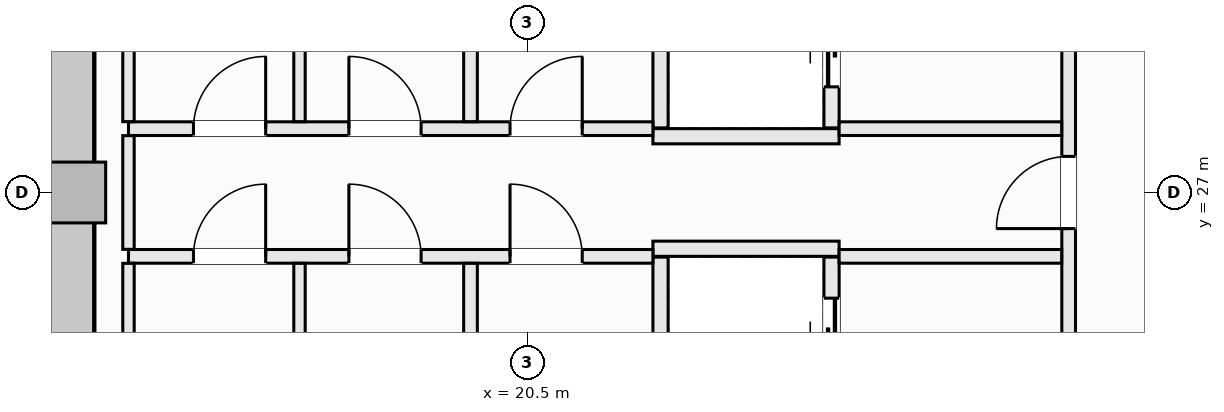
"""IFC4 building model, lengths in metres.
Left out: names, types, materials, properties, quantities, classifications, styles, units other than length and angle.
Written with IfcOpenShell. Run it as: python <this file> out.ifc"""

import sys

from ifc_helpers import new_model, si_unit, direction, frame, frame_2d, origin, origin_2d, place, context, subcontext, project, spatial, rectangle, extrude, element, fill, save


model = new_model("IFC4")
c1 = context("Model", 3, precision=1e-05, world=origin(), true_north=direction((0.0, 1.0)))
c2 = subcontext(c1, "Body", "Model", "MODEL_VIEW")
j1 = project(units=[si_unit("LENGTHUNIT", "METRE"), si_unit("PLANEANGLEUNIT", "RADIAN")], contexts=[c1])
p1 = place(None, origin())
s1 = spatial("IfcSite", under=j1, at=p1, CompositionType="ELEMENT")
p2 = place(p1, origin())
s2 = spatial("IfcBuilding", under=s1, at=p2, CompositionType="ELEMENT")
p3 = place(p2, frame((0.0, 0.0, 156.3)))
s3 = spatial("IfcBuildingStorey", under=s2, at=p3, CompositionType="ELEMENT", Elevation=156.3)
p4 = place(p3, frame((14.475, 20.55, -0.27), z_axis=(0.0, 0.0, 1.0), x_axis=(0.0, 1.0, 0.0)))
e1 = element("IfcWall", 1, at=p4, inside=s3, PredefinedType="SHEAR", context=c2, shape_type="SweptSolid", body=[
    extrude(rectangle(XDim=12.9, YDim=0.65, at=frame_2d((6.45, 0.0))), origin(), (0.0, 0.0, 1.0), 3.4),
])
p5 = place(p3, frame((14.55, 27.0, -0.27), z_axis=(0.0, 0.0, 1.0), x_axis=(1.0, 0.0, 0.0)))
e2 = element("IfcColumn", 2, at=p5, inside=s3, PredefinedType="PILASTER", context=c2, shape_type="SweptSolid", body=[
    extrude(rectangle(XDim=0.8, YDim=0.8, at=origin_2d()), origin(), (0.0, 0.0, 1.0), 3.4),
])
p6 = place(p3, frame((22.15, 27.74, 0.0), z_axis=(0.0, 0.0, 1.0), x_axis=(1.0, 0.0, 0.0)))
e3 = element("IfcWall", 3, at=p6, inside=s3, PredefinedType="SOLIDWALL", context=c2, shape_type="SweptSolid", body=[
    extrude(rectangle(XDim=2.45, YDim=0.2, at=frame_2d((1.225, 0.0))), origin(), (0.0, 0.0, 1.0), 3.13),
])
p7 = place(p3, frame((22.25, 27.85, 0.0), z_axis=(0.0, 0.0, 1.0), x_axis=(0.0, 1.0, 0.0)))
e4 = element("IfcWall", 4, at=p7, inside=s3, PredefinedType="SOLIDWALL", context=c2, shape_type="SweptSolid", body=[
    extrude(rectangle(XDim=2.18, YDim=0.2, at=frame_2d((1.09, 0.0))), origin(), (0.0, 0.0, 1.0), 3.13),
])
p8 = place(p3, frame((24.5, 27.85, 0.0), z_axis=(0.0, 0.0, 1.0), x_axis=(0.0, 1.0, 0.0)))
e5 = element("IfcWall", 5, at=p8, inside=s3, PredefinedType="SOLIDWALL", context=c2, shape_type="SweptSolid", body=[
    extrude(rectangle(XDim=2.18, YDim=0.2, at=frame_2d((1.09, 0.0))), origin(), (0.0, 0.0, 1.0), 3.13),
])
p9 = place(p8, frame((0.54, 0.0, 0.0)))
e6 = element("IfcOpeningElement", 6, at=p9, cuts=e5, PredefinedType="OPENING", context=c2, shape_type="SweptSolid", body=[
    extrude(rectangle(XDim=1.1, YDim=2.2, at=frame_2d((0.55, 1.1))), frame((0.0, 0.11, 0.0), z_axis=(0.0, -1.0, 0.0), x_axis=(1.0, 0.0, 0.0)), (0.0, 0.0, 1.0), 0.22),
])
p10 = place(p3, frame((22.15, 26.26, 0.0), z_axis=(0.0, 0.0, 1.0), x_axis=(1.0, 0.0, 0.0)))
e7 = element("IfcWall", 7, at=p10, inside=s3, PredefinedType="SOLIDWALL", context=c2, shape_type="SweptSolid", body=[
    extrude(rectangle(XDim=2.45, YDim=0.2, at=frame_2d((1.225, 0.0))), origin(), (0.0, 0.0, 1.0), 3.13),
])
p11 = place(p3, frame((22.25, 23.97, 0.0), z_axis=(0.0, 0.0, 1.0), x_axis=(0.0, 1.0, 0.0)))
e8 = element("IfcWall", 8, at=p11, inside=s3, PredefinedType="SOLIDWALL", context=c2, shape_type="SweptSolid", body=[
    extrude(rectangle(XDim=2.18, YDim=0.2, at=frame_2d((1.09, 0.0))), origin(), (0.0, 0.0, 1.0), 3.13),
])
p12 = place(p3, frame((24.5, 23.97, 0.0), z_axis=(0.0, 0.0, 1.0), x_axis=(0.0, 1.0, 0.0)))
e9 = element("IfcWall", 9, at=p12, inside=s3, PredefinedType="SOLIDWALL", context=c2, shape_type="SweptSolid", body=[
    extrude(rectangle(XDim=2.18, YDim=0.2, at=frame_2d((1.09, 0.0))), origin(), (0.0, 0.0, 1.0), 3.13),
])
p13 = place(p12, frame((0.54, 0.0, 0.0)))
e10 = element("IfcOpeningElement", 10, at=p13, cuts=e9, PredefinedType="OPENING", context=c2, shape_type="SweptSolid", body=[
    extrude(rectangle(XDim=1.1, YDim=2.2, at=frame_2d((0.55, 1.1))), frame((0.0, 0.11, 0.0), z_axis=(0.0, -1.0, 0.0), x_axis=(1.0, 0.0, 0.0)), (0.0, 0.0, 1.0), 0.22),
])
p14 = place(p3, frame((27.62, 22.05, 0.0), z_axis=(0.0, 0.0, 1.0), x_axis=(0.0, 1.0, 0.0)))
e11 = element("IfcWall", 11, at=p14, inside=s3, PredefinedType="SOLIDWALL", context=c2, shape_type="SweptSolid", body=[
    extrude(rectangle(XDim=9.9, YDim=0.18, at=frame_2d((4.95, 0.0))), origin(), (0.0, 0.0, 1.0), 3.13),
])
p15 = place(p14, frame((4.475, 0.0, 0.0)))
e12 = element("IfcOpeningElement", 12, at=p15, cuts=e11, PredefinedType="OPENING", context=c2, shape_type="SweptSolid", body=[
    extrude(rectangle(XDim=0.95, YDim=2.1, at=frame_2d((0.475, 1.05))), frame((0.0, 0.1, 0.0), z_axis=(0.0, -1.0, 0.0), x_axis=(1.0, 0.0, 0.0)), (0.0, 0.0, 1.0), 0.2),
])
p16 = place(p14, frame((6.89, 0.0, 0.0)))
e13 = element("IfcOpeningElement", 13, at=p16, cuts=e11, PredefinedType="OPENING", context=c2, shape_type="SweptSolid", body=[
    extrude(rectangle(XDim=1.5, YDim=2.2, at=frame_2d((0.75, 1.1))), frame((0.0, 0.1, 0.0), z_axis=(0.0, -1.0, 0.0), x_axis=(1.0, 0.0, 0.0)), (0.0, 0.0, 1.0), 0.2),
])
p17 = place(p14, frame((1.51, 0.0, 0.0)))
e14 = element("IfcOpeningElement", 14, at=p17, cuts=e11, PredefinedType="OPENING", context=c2, shape_type="SweptSolid", body=[
    extrude(rectangle(XDim=1.5, YDim=2.2, at=frame_2d((0.75, 1.1))), frame((0.0, 0.1, 0.0), z_axis=(0.0, -1.0, 0.0), x_axis=(1.0, 0.0, 0.0)), (0.0, 0.0, 1.0), 0.2),
])
p18 = place(p3, frame((15.25, 27.84, 0.0), z_axis=(0.0, 0.0, 1.0), x_axis=(1.0, 0.0, 0.0)))
e15 = element("IfcWall", 15, at=p18, inside=s3, PredefinedType="SOLIDWALL", context=c2, shape_type="SweptSolid", body=[
    extrude(rectangle(XDim=6.9, YDim=0.18, at=frame_2d((3.45, 0.0))), origin(), (0.0, 0.0, 1.0), 3.13),
])
p19 = place(p18, frame((5.02, 0.0, 0.0)))
e16 = element("IfcOpeningElement", 16, at=p19, cuts=e15, PredefinedType="OPENING", context=c2, shape_type="SweptSolid", body=[
    extrude(rectangle(XDim=0.95, YDim=2.1, at=frame_2d((0.475, 1.05))), frame((0.0, 0.1, 0.0), z_axis=(0.0, -1.0, 0.0), x_axis=(1.0, 0.0, 0.0)), (0.0, 0.0, 1.0), 0.2),
])
p20 = place(p18, frame((0.855, 0.0, 0.0)))
e17 = element("IfcOpeningElement", 17, at=p20, cuts=e15, PredefinedType="OPENING", context=c2, shape_type="SweptSolid", body=[
    extrude(rectangle(XDim=0.95, YDim=2.1, at=frame_2d((0.475, 1.05))), frame((0.0, 0.1, 0.0), z_axis=(0.0, -1.0, 0.0), x_axis=(1.0, 0.0, 0.0)), (0.0, 0.0, 1.0), 0.2),
])
p21 = place(p18, frame((2.9, 0.0, 0.0)))
e18 = element("IfcOpeningElement", 18, at=p21, cuts=e15, PredefinedType="OPENING", context=c2, shape_type="SweptSolid", body=[
    extrude(rectangle(XDim=0.95, YDim=2.1, at=frame_2d((0.475, 1.05))), frame((0.0, 0.1, 0.0), z_axis=(0.0, -1.0, 0.0), x_axis=(1.0, 0.0, 0.0)), (0.0, 0.0, 1.0), 0.2),
])
p22 = place(p3, frame((24.6, 27.84, 0.0), z_axis=(0.0, 0.0, 1.0), x_axis=(1.0, 0.0, 0.0)))
e19 = element("IfcWall", 19, at=p22, inside=s3, PredefinedType="SOLIDWALL", context=c2, shape_type="SweptSolid", body=[
    extrude(rectangle(XDim=2.928, YDim=0.18, at=frame_2d((1.464, 0.0))), origin(), (0.0, 0.0, 1.0), 3.13),
])
p23 = place(p3, frame((15.25, 26.16, 0.0), z_axis=(0.0, 0.0, 1.0), x_axis=(1.0, 0.0, 0.0)))
e20 = element("IfcWall", 20, at=p23, inside=s3, PredefinedType="SOLIDWALL", context=c2, shape_type="SweptSolid", body=[
    extrude(rectangle(XDim=6.9, YDim=0.18, at=frame_2d((3.45, 0.0))), origin(), (0.0, 0.0, 1.0), 3.13),
])
p24 = place(p23, frame((5.02, 0.0, 0.0)))
e21 = element("IfcOpeningElement", 21, at=p24, cuts=e20, PredefinedType="OPENING", context=c2, shape_type="SweptSolid", body=[
    extrude(rectangle(XDim=0.95, YDim=2.1, at=frame_2d((0.475, 1.05))), frame((0.0, 0.1, 0.0), z_axis=(0.0, -1.0, 0.0), x_axis=(1.0, 0.0, 0.0)), (0.0, 0.0, 1.0), 0.2),
])
p25 = place(p23, frame((0.855, 0.0, 0.0)))
e22 = element("IfcOpeningElement", 22, at=p25, cuts=e20, PredefinedType="OPENING", context=c2, shape_type="SweptSolid", body=[
    extrude(rectangle(XDim=0.95, YDim=2.1, at=frame_2d((0.475, 1.05))), frame((0.0, 0.1, 0.0), z_axis=(0.0, -1.0, 0.0), x_axis=(1.0, 0.0, 0.0)), (0.0, 0.0, 1.0), 0.2),
])
p26 = place(p23, frame((2.9, 0.0, 0.0)))
e23 = element("IfcOpeningElement", 23, at=p26, cuts=e20, PredefinedType="OPENING", context=c2, shape_type="SweptSolid", body=[
    extrude(rectangle(XDim=0.95, YDim=2.1, at=frame_2d((0.475, 1.05))), frame((0.0, 0.1, 0.0), z_axis=(0.0, -1.0, 0.0), x_axis=(1.0, 0.0, 0.0)), (0.0, 0.0, 1.0), 0.2),
])
p27 = place(p3, frame((24.6, 26.16, 0.0), z_axis=(0.0, 0.0, 1.0), x_axis=(1.0, 0.0, 0.0)))
e24 = element("IfcWall", 24, at=p27, inside=s3, PredefinedType="SOLIDWALL", context=c2, shape_type="SweptSolid", body=[
    extrude(rectangle(XDim=2.928, YDim=0.18, at=frame_2d((1.464, 0.0))), origin(), (0.0, 0.0, 1.0), 3.13),
])
p28 = place(p3, frame((15.25, 23.962, 0.0), z_axis=(0.0, 0.0, 1.0), x_axis=(0.0, 1.0, 0.0)))
e25 = element("IfcWall", 25, at=p28, inside=s3, PredefinedType="PARTITIONING", context=c2, shape_type="SweptSolid", body=[
    extrude(rectangle(XDim=2.106, YDim=0.15, at=frame_2d((1.053, 0.0))), origin(), (0.0, 0.0, 1.0), 3.13),
])
p29 = place(p3, frame((15.25, 26.252, 0.0), z_axis=(0.0, 0.0, 1.0), x_axis=(0.0, 1.0, 0.0)))
e26 = element("IfcWall", 26, at=p29, inside=s3, PredefinedType="PARTITIONING", context=c2, shape_type="SweptSolid", body=[
    extrude(rectangle(XDim=1.496, YDim=0.15, at=frame_2d((0.748, 0.0))), origin(), (0.0, 0.0, 1.0), 3.13),
])
p30 = place(p3, frame((15.25, 27.932, 0.0), z_axis=(0.0, 0.0, 1.0), x_axis=(0.0, 1.0, 0.0)))
e27 = element("IfcWall", 27, at=p30, inside=s3, PredefinedType="PARTITIONING", context=c2, shape_type="SweptSolid", body=[
    extrude(rectangle(XDim=2.106, YDim=0.15, at=frame_2d((1.053, 0.0))), origin(), (0.0, 0.0, 1.0), 3.13),
])
for number, where, z_axis, x_axis in (
    (28, (19.75, 23.962, 0.0), (0.0, 0.0, 1.0), (0.0, 1.0, 0.0)),
    (29, (19.75, 27.932, 0.0), (0.0, 0.0, 1.0), (0.0, 1.0, 0.0)),
):
    element("IfcWall", number, at=place(p3, frame(where, z_axis=z_axis, x_axis=x_axis)), inside=s3, PredefinedType="SOLIDWALL", context=c2, shape_type="SweptSolid", body=[
        extrude(rectangle(XDim=2.106, YDim=0.18, at=frame_2d((1.053, 0.0))), origin(), (0.0, 0.0, 1.0), 3.13),
    ])
for number, where, z_axis, x_axis in (
    (30, (17.5, 23.962, 0.0), (0.0, 0.0, 1.0), (0.0, 1.0, 0.0)),
    (31, (17.5, 27.932, 0.0), (0.0, 0.0, 1.0), (0.0, 1.0, 0.0)),
):
    element("IfcWall", number, at=place(p3, frame(where, z_axis=z_axis, x_axis=x_axis)), inside=s3, PredefinedType="PARTITIONING", context=c2, shape_type="SweptSolid", body=[
        extrude(rectangle(XDim=2.106, YDim=0.15, at=frame_2d((1.053, 0.0))), origin(), (0.0, 0.0, 1.0), 3.13),
    ])
p31 = place(p9, origin())
e32 = element("IfcDoor", 32, at=p31, inside=s3, OperationType="SLIDING_TO_LEFT", PredefinedType="DOOR", context=c2, shape_type="SweptSolid", body=[
    extrude(rectangle(XDim=1.1, YDim=2.2, at=frame_2d((0.55, 1.1))), frame((0.0, 0.025, 0.0), z_axis=(0.0, -1.0, 0.0), x_axis=(1.0, 0.0, 0.0)), (0.0, 0.0, 1.0), 0.05),
])
fill(e6, e32)
p32 = place(p13, origin())
e33 = element("IfcDoor", 33, at=p32, inside=s3, OperationType="SLIDING_TO_LEFT", PredefinedType="DOOR", context=c2, shape_type="SweptSolid", body=[
    extrude(rectangle(XDim=1.1, YDim=2.2, at=frame_2d((0.55, 1.1))), frame((0.0, 0.025, 0.0), z_axis=(0.0, -1.0, 0.0), x_axis=(1.0, 0.0, 0.0)), (0.0, 0.0, 1.0), 0.05),
])
fill(e10, e33)
p33 = place(p15, origin())
e34 = element("IfcDoor", 34, at=p33, inside=s3, OperationType="SINGLE_SWING_LEFT", PredefinedType="DOOR", context=c2, shape_type="SweptSolid", body=[
    extrude(rectangle(XDim=0.95, YDim=2.1, at=frame_2d((0.475, 1.05))), frame((0.0, 0.025, 0.0), z_axis=(0.0, -1.0, 0.0), x_axis=(1.0, 0.0, 0.0)), (0.0, 0.0, 1.0), 0.05),
])
fill(e12, e34)
p34 = place(p19, origin())
e35 = element("IfcDoor", 35, at=p34, inside=s3, OperationType="SINGLE_SWING_RIGHT", PredefinedType="DOOR", context=c2, shape_type="SweptSolid", body=[
    extrude(rectangle(XDim=0.95, YDim=2.1, at=frame_2d((0.475, 1.05))), frame((0.0, 0.025, 0.0), z_axis=(0.0, -1.0, 0.0), x_axis=(1.0, 0.0, 0.0)), (0.0, 0.0, 1.0), 0.05),
])
fill(e16, e35)
p35 = place(p24, origin())
e36 = element("IfcDoor", 36, at=p35, inside=s3, OperationType="SINGLE_SWING_LEFT", PredefinedType="DOOR", context=c2, shape_type="SweptSolid", body=[
    extrude(rectangle(XDim=0.95, YDim=2.1, at=frame_2d((0.475, 1.05))), frame((0.0, 0.025, 0.0), z_axis=(0.0, -1.0, 0.0), x_axis=(1.0, 0.0, 0.0)), (0.0, 0.0, 1.0), 0.05),
])
fill(e21, e36)
p36 = place(p20, origin())
e37 = element("IfcDoor", 37, at=p36, inside=s3, OperationType="SINGLE_SWING_RIGHT", PredefinedType="DOOR", context=c2, shape_type="SweptSolid", body=[
    extrude(rectangle(XDim=0.95, YDim=2.1, at=frame_2d((0.475, 1.05))), frame((0.0, 0.025, 0.0), z_axis=(0.0, -1.0, 0.0), x_axis=(1.0, 0.0, 0.0)), (0.0, 0.0, 1.0), 0.05),
])
fill(e17, e37)
p37 = place(p21, origin())
e38 = element("IfcDoor", 38, at=p37, inside=s3, OperationType="SINGLE_SWING_LEFT", PredefinedType="DOOR", context=c2, shape_type="SweptSolid", body=[
    extrude(rectangle(XDim=0.95, YDim=2.1, at=frame_2d((0.475, 1.05))), frame((0.0, 0.025, 0.0), z_axis=(0.0, -1.0, 0.0), x_axis=(1.0, 0.0, 0.0)), (0.0, 0.0, 1.0), 0.05),
])
fill(e18, e38)
p38 = place(p25, origin())
e39 = element("IfcDoor", 39, at=p38, inside=s3, OperationType="SINGLE_SWING_RIGHT", PredefinedType="DOOR", context=c2, shape_type="SweptSolid", body=[
    extrude(rectangle(XDim=0.95, YDim=2.1, at=frame_2d((0.475, 1.05))), frame((0.0, 0.025, 0.0), z_axis=(0.0, -1.0, 0.0), x_axis=(1.0, 0.0, 0.0)), (0.0, 0.0, 1.0), 0.05),
])
fill(e22, e39)
p39 = place(p26, origin())
e40 = element("IfcDoor", 40, at=p39, inside=s3, OperationType="SINGLE_SWING_LEFT", PredefinedType="DOOR", context=c2, shape_type="SweptSolid", body=[
    extrude(rectangle(XDim=0.95, YDim=2.1, at=frame_2d((0.475, 1.05))), frame((0.0, 0.025, 0.0), z_axis=(0.0, -1.0, 0.0), x_axis=(1.0, 0.0, 0.0)), (0.0, 0.0, 1.0), 0.05),
])
fill(e23, e40)
save(model, sys.argv[1])
